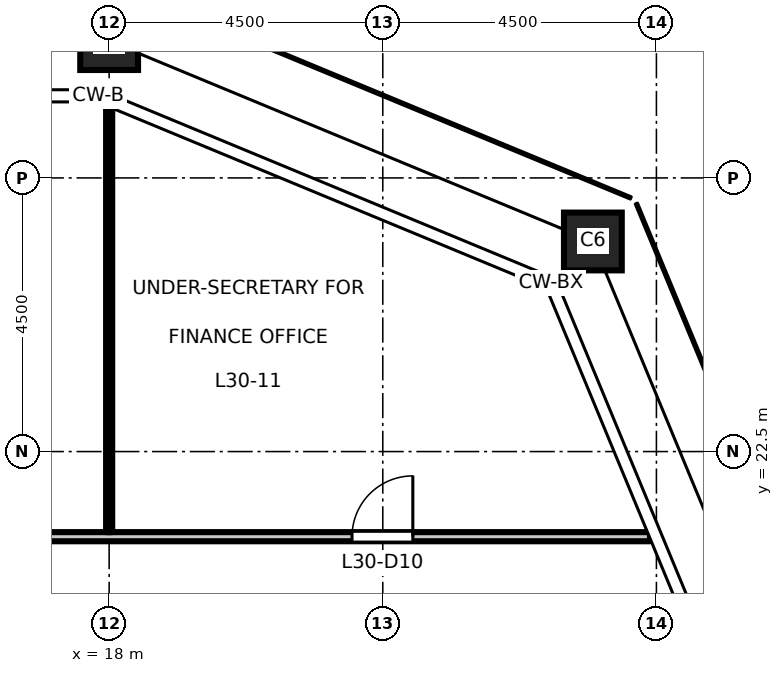
"""IFC4 building model, lengths in metres.
Left out: names, types, materials, properties, quantities, classifications, styles, units other than length and angle.
Written with IfcOpenShell. Run it as: python <this file> out.ifc"""

import sys

from ifc_helpers import new_model, si_unit, direction, frame, frame_2d, origin, origin_2d, place, context, subcontext, project, spatial, rectangle, hollow_rectangle, extrude, element, fill, save


model = new_model("IFC4")
c1 = context("Model", 3, precision=1e-05, world=origin(), true_north=direction((0.0, 1.0)))
c2 = subcontext(c1, "Body", "Model", "MODEL_VIEW")
j1 = project(units=[si_unit("LENGTHUNIT", "METRE"), si_unit("PLANEANGLEUNIT", "RADIAN")], contexts=[c1])
p1 = place(None, origin())
s1 = spatial("IfcSite", under=j1, at=p1, CompositionType="ELEMENT")
p2 = place(p1, origin())
s2 = spatial("IfcBuilding", under=s1, at=p2, CompositionType="ELEMENT")
p3 = place(p2, frame((0.0, 0.0, 140.7)))
s3 = spatial("IfcBuildingStorey", under=s2, at=p3, CompositionType="ELEMENT", Elevation=140.7)
for number, where, z_axis, x_axis in (
    (1, (25.955, 25.955, 0.0), (0.0, 0.0, 1.0), (1.0, 0.0, 0.0)),
    (2, (18.0, 29.25, 0.0), (0.0, 0.0, 1.0), (1.0, 0.0, 0.0)),
):
    element("IfcColumn", number, at=place(p3, frame(where, z_axis=z_axis, x_axis=x_axis)), inside=s3, PredefinedType="COLUMN", context=c2, shape_type="SweptSolid", body=[
        extrude(hollow_rectangle(XDim=0.95, YDim=0.95, WallThickness=0.055, at=origin_2d()), origin(), (0.0, 0.0, 1.0), 4.5),
    ])
p4 = place(p3, frame((-26.894, 21.1, 0.0), z_axis=(0.0, 0.0, 1.0), x_axis=(1.0, 0.0, 0.0)))
e3 = element("IfcWall", 3, at=p4, inside=s3, PredefinedType="PARTITIONING", context=c2, shape_type="SweptSolid", body=[
    extrude(rectangle(XDim=53.788, YDim=0.15, at=frame_2d((26.894, 0.0))), origin(), (0.0, 0.0, 1.0), 4.35),
])
p5 = place(p4, frame((12.994, 0.0, 0.0)))
e4 = element("IfcOpeningElement", 4, at=p5, cuts=e3, PredefinedType="OPENING", context=c2, shape_type="SweptSolid", body=[
    extrude(rectangle(XDim=1.0, YDim=2.1, at=frame_2d((0.5, 1.05))), frame((0.0, 0.085, 0.0), z_axis=(0.0, -1.0, 0.0), x_axis=(1.0, 0.0, 0.0)), (0.0, 0.0, 1.0), 0.17),
])
p6 = place(p4, frame((21.994, 0.0, 0.0)))
e5 = element("IfcOpeningElement", 5, at=p6, cuts=e3, PredefinedType="OPENING", context=c2, shape_type="SweptSolid", body=[
    extrude(rectangle(XDim=1.0, YDim=2.1, at=frame_2d((0.5, 1.05))), frame((0.0, 0.085, 0.0), z_axis=(0.0, -1.0, 0.0), x_axis=(1.0, 0.0, 0.0)), (0.0, 0.0, 1.0), 0.17),
])
p7 = place(p4, frame((30.994, 0.0, 0.0)))
e6 = element("IfcOpeningElement", 6, at=p7, cuts=e3, PredefinedType="OPENING", context=c2, shape_type="SweptSolid", body=[
    extrude(rectangle(XDim=1.0, YDim=2.1, at=frame_2d((0.5, 1.05))), frame((0.0, 0.085, 0.0), z_axis=(0.0, -1.0, 0.0), x_axis=(1.0, 0.0, 0.0)), (0.0, 0.0, 1.0), 0.17),
])
p8 = place(p4, frame((39.994, 0.0, 0.0)))
e7 = element("IfcOpeningElement", 7, at=p8, cuts=e3, PredefinedType="OPENING", context=c2, shape_type="SweptSolid", body=[
    extrude(rectangle(XDim=1.0, YDim=2.1, at=frame_2d((0.5, 1.05))), frame((0.0, 0.085, 0.0), z_axis=(0.0, -1.0, 0.0), x_axis=(1.0, 0.0, 0.0)), (0.0, 0.0, 1.0), 0.17),
])
p9 = place(p4, frame((3.994, 0.0, 0.0)))
e8 = element("IfcOpeningElement", 8, at=p9, cuts=e3, PredefinedType="OPENING", context=c2, shape_type="SweptSolid", body=[
    extrude(rectangle(XDim=1.0, YDim=2.1, at=frame_2d((0.5, 1.05))), frame((0.0, 0.085, 0.0), z_axis=(0.0, -1.0, 0.0), x_axis=(1.0, 0.0, 0.0)), (0.0, 0.0, 1.0), 0.17),
])
p10 = place(p4, frame((48.888, 0.0, 0.0)))
e9 = element("IfcOpeningElement", 9, at=p10, cuts=e3, PredefinedType="OPENING", context=c2, shape_type="SweptSolid", body=[
    extrude(rectangle(XDim=1.0, YDim=2.1, at=frame_2d((0.5, 1.05))), frame((0.0, 0.085, 0.0), z_axis=(0.0, -1.0, 0.0), x_axis=(1.0, 0.0, 0.0)), (0.0, 0.0, 1.0), 0.17),
])
p11 = place(p3, frame((18.0, 21.175, 0.0), z_axis=(0.0, 0.0, 1.0), x_axis=(0.0, 1.0, 0.0)))
e10 = element("IfcWall", 10, at=p11, inside=s3, PredefinedType="PARTITIONING", context=c2, shape_type="SweptSolid", body=[
    extrude(rectangle(XDim=7.003, YDim=0.1, at=frame_2d((3.501, 0.0))), origin(), (0.0, 0.0, 1.0), 3.45),
])
p12 = place(p10, origin())
e11 = element("IfcDoor", 11, at=p12, inside=s3, OperationType="SINGLE_SWING_RIGHT", PredefinedType="DOOR", context=c2, shape_type="SweptSolid", body=[
    extrude(rectangle(XDim=1.0, YDim=2.1, at=frame_2d((0.5, 1.05))), frame((0.0, 0.025, 0.0), z_axis=(0.0, -1.0, 0.0), x_axis=(1.0, 0.0, 0.0)), (0.0, 0.0, 1.0), 0.05),
])
fill(e9, e11)
save(model, sys.argv[1])
